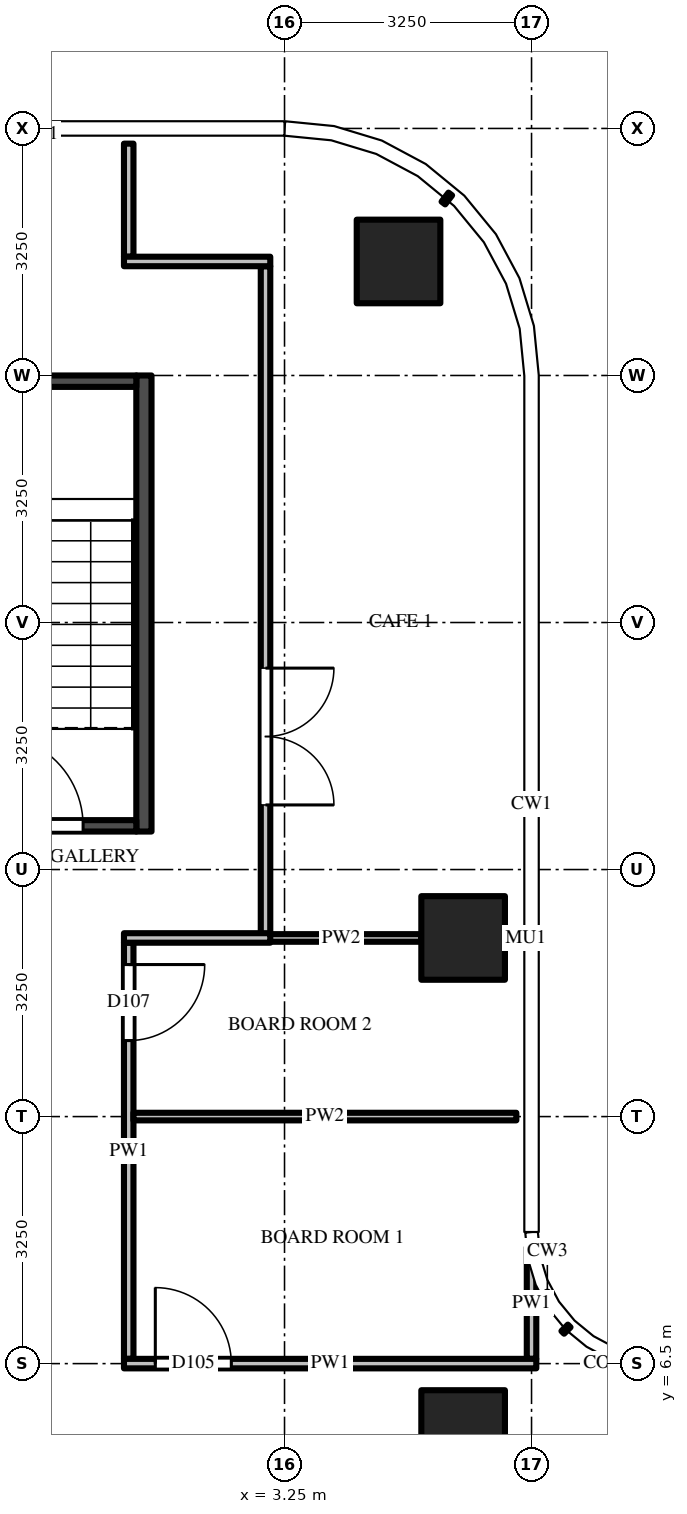
"""IFC4 building model, lengths in metres.
Left out: names, types, materials, properties, quantities, classifications, styles, units other than length and angle.
Written with IfcOpenShell. Run it as: python <this file> out.ifc"""

import sys

from ifc_helpers import new_model, si_unit, direction, frame, frame_2d, origin, origin_2d, place, context, subcontext, project, spatial, rectangle, extrude, source, transform, mapped, element, fill, save


model = new_model("IFC4")
c1 = context("Model", 3, precision=1e-05, world=origin(), true_north=direction((0.0, 1.0)))
c2 = subcontext(c1, "Body", "Model", "MODEL_VIEW")
j1 = project(units=[si_unit("LENGTHUNIT", "METRE"), si_unit("PLANEANGLEUNIT", "RADIAN")], contexts=[c1])
p1 = place(None, origin())
s1 = spatial("IfcSite", under=j1, at=p1, CompositionType="ELEMENT")
p2 = place(p1, origin())
s2 = spatial("IfcBuilding", under=s1, at=p2, CompositionType="ELEMENT")
p3 = place(p2, frame((0.0, 0.0, 251.9)))
s3 = spatial("IfcBuildingStorey", under=s2, at=p3, CompositionType="ELEMENT", Elevation=251.9)
m1 = source(origin(), c2, "Body", "SweptSolid", [
    extrude(rectangle(XDim=1.1, YDim=1.1, at=origin_2d()), origin(), (0.0, 0.0, 1.0), 3.9),
])
for number, where, z_axis, x_axis in (
    (1, (5.6, 12.1, 0.0), (0.0, 0.0, 1.0), (1.0, 0.0, 0.0)),
    (2, (4.75, 21.0, 0.0), (0.0, 0.0, 1.0), (1.0, 0.0, 0.0)),
    (3, (5.6, 5.6, 0.0), (0.0, 0.0, 1.0), (1.0, 0.0, 0.0)),
):
    element("IfcColumn", number, at=place(p3, frame(where, z_axis=z_axis, x_axis=x_axis)), inside=s3, PredefinedType="COLUMN", context=c2, shape_type="MappedRepresentation", body=[
        mapped(m1, transform((0.0, 0.0, 0.0))),
    ])
m2 = source(origin(), c2, "Body", "SweptSolid", [
    extrude(rectangle(XDim=6.0, YDim=0.2, at=frame_2d((3.0, 0.0))), origin(), (0.0, 0.0, 1.0), 3.7),
])
p4 = place(p3, frame((1.4, 13.5, 0.0), z_axis=(0.0, 0.0, 1.0), x_axis=(0.0, 1.0, 0.0)))
e4 = element("IfcWall", 4, at=p4, inside=s3, PredefinedType="SHEAR", context=c2, shape_type="MappedRepresentation", body=[
    mapped(m2, transform((0.0, 0.0, 0.0))),
])
m3 = source(origin(), c2, "Body", "SweptSolid", [
    extrude(rectangle(XDim=2.6, YDim=0.15, at=frame_2d((1.3, 0.0))), origin(), (0.0, 0.0, 1.0), 3.7),
])
p5 = place(p3, frame((-1.3, 13.575, 0.0), z_axis=(0.0, 0.0, 1.0), x_axis=(1.0, 0.0, 0.0)))
e5 = element("IfcWall", 5, at=p5, inside=s3, PredefinedType="SHEAR", context=c2, shape_type="MappedRepresentation", body=[
    mapped(m3, transform((0.0, 0.0, 0.0))),
])
m4 = source(origin(), c2, "Body", "SweptSolid", [
    extrude(rectangle(XDim=1.2, YDim=2.1, at=frame_2d((0.6, 1.05))), frame((0.0, 0.085, 0.0), z_axis=(0.0, -1.0, 0.0), x_axis=(1.0, 0.0, 0.0)), (0.0, 0.0, 1.0), 0.17),
])
p6 = place(p5, frame((0.7, 0.0, 0.0)))
e6 = element("IfcOpeningElement", 6, at=p6, cuts=e5, PredefinedType="OPENING", context=c2, shape_type="MappedRepresentation", body=[
    mapped(m4, transform((0.0, 0.0, 0.0))),
])
p7 = place(p3, frame((-1.3, 19.425, 0.0), z_axis=(0.0, 0.0, 1.0), x_axis=(1.0, 0.0, 0.0)))
e7 = element("IfcWall", 7, at=p7, inside=s3, PredefinedType="SHEAR", context=c2, shape_type="MappedRepresentation", body=[
    mapped(m3, transform((0.0, 0.0, 0.0))),
])
m5 = source(origin(), c2, "Body", "SweptSolid", [
    extrude(rectangle(XDim=5.475, YDim=0.125, at=frame_2d((2.738, 0.0))), origin(), (0.0, 0.0, 1.0), 2.997),
])
p8 = place(p3, frame((1.2, 12.038, 0.0), z_axis=(0.0, 0.0, 1.0), x_axis=(0.0, -1.0, 0.0)))
e8 = element("IfcWall", 8, at=p8, inside=s3, PredefinedType="PARTITIONING", context=c2, shape_type="MappedRepresentation", body=[
    mapped(m5, transform((0.0, 0.0, 0.0))),
])
m6 = source(origin(), c2, "Body", "SweptSolid", [
    extrude(rectangle(XDim=1.0, YDim=2.1, at=frame_2d((0.5, 1.05))), frame((0.0, 0.073, 0.0), z_axis=(0.0, -1.0, 0.0), x_axis=(1.0, 0.0, 0.0)), (0.0, 0.0, 1.0), 0.145),
])
p9 = place(p8, frame((0.288, 0.0, 0.0)))
e9 = element("IfcOpeningElement", 9, at=p9, cuts=e8, PredefinedType="OPENING", context=c2, shape_type="MappedRepresentation", body=[
    mapped(m6, transform((0.0, 0.0, 0.0))),
])
m7 = source(origin(), c2, "Body", "SweptSolid", [
    extrude(rectangle(XDim=1.488, YDim=0.125, at=frame_2d((0.744, 0.0))), origin(), (0.0, 0.0, 1.0), 2.78),
])
p10 = place(p3, frame((1.2, 22.55, 0.0), z_axis=(0.0, 0.0, 1.0), x_axis=(0.0, -1.0, 0.0)))
e10 = element("IfcWall", 10, at=p10, inside=s3, PredefinedType="PARTITIONING", context=c2, shape_type="MappedRepresentation", body=[
    mapped(m7, transform((0.0, 0.0, 0.0))),
])
m8 = source(origin(), c2, "Body", "SweptSolid", [
    extrude(rectangle(XDim=8.788, YDim=0.125, at=frame_2d((4.394, 0.0))), origin(), (0.0, 0.0, 1.0), 2.78),
])
p11 = place(p3, frame((3.0, 20.938, 0.0), z_axis=(0.0, 0.0, 1.0), x_axis=(0.0, -1.0, 0.0)))
e11 = element("IfcWall", 11, at=p11, inside=s3, PredefinedType="PARTITIONING", context=c2, shape_type="MappedRepresentation", body=[
    mapped(m8, transform((0.0, 0.0, 0.0))),
])
m9 = source(origin(), c2, "Body", "SweptSolid", [
    extrude(rectangle(XDim=1.8, YDim=2.1, at=frame_2d((0.9, 1.05))), frame((0.0, 0.073, 0.0), z_axis=(0.0, -1.0, 0.0), x_axis=(1.0, 0.0, 0.0)), (0.0, 0.0, 1.0), 0.145),
])
p12 = place(p11, frame((5.288, 0.0, 0.0)))
e12 = element("IfcOpeningElement", 12, at=p12, cuts=e11, PredefinedType="OPENING", context=c2, shape_type="MappedRepresentation", body=[
    mapped(m9, transform((0.0, 0.0, 0.0))),
])
m10 = source(origin(), c2, "Body", "SweptSolid", [
    extrude(rectangle(XDim=1.469, YDim=0.125, at=frame_2d((0.734, 0.0))), origin(), (0.0, 0.0, 1.0), 3.7),
])
p13 = place(p3, frame((6.5, 6.562, 0.0), z_axis=(0.0, 0.0, 1.0), x_axis=(0.0, 1.0, 0.0)))
e13 = element("IfcWall", 13, at=p13, inside=s3, PredefinedType="PARTITIONING", context=c2, shape_type="MappedRepresentation", body=[
    mapped(m10, transform((0.0, 0.0, 0.0))),
])
m11 = source(origin(), c2, "Body", "SweptSolid", [
    extrude(rectangle(XDim=5.425, YDim=0.125, at=frame_2d((2.712, 0.0))), origin(), (0.0, 0.0, 1.0), 2.78),
])
p14 = place(p3, frame((1.137, 6.5, 0.0), z_axis=(0.0, 0.0, 1.0), x_axis=(1.0, 0.0, 0.0)))
e14 = element("IfcWall", 14, at=p14, inside=s3, PredefinedType="PARTITIONING", context=c2, shape_type="MappedRepresentation", body=[
    mapped(m11, transform((0.0, 0.0, 0.0))),
])
p15 = place(p14, frame((0.413, 0.0, 0.0)))
e15 = element("IfcOpeningElement", 15, at=p15, cuts=e14, PredefinedType="OPENING", context=c2, shape_type="MappedRepresentation", body=[
    mapped(m6, transform((0.0, 0.0, 0.0))),
])
m12 = source(origin(), c2, "Body", "SweptSolid", [
    extrude(rectangle(XDim=5.038, YDim=0.1, at=frame_2d((2.519, 0.0))), origin(), (0.0, 0.0, 1.0), 2.78),
])
p16 = place(p3, frame((1.262, 9.75, 0.0), z_axis=(0.0, 0.0, 1.0), x_axis=(1.0, 0.0, 0.0)))
e16 = element("IfcWall", 16, at=p16, inside=s3, PredefinedType="PARTITIONING", context=c2, shape_type="MappedRepresentation", body=[
    mapped(m12, transform((0.0, 0.0, 0.0))),
])
m13 = source(origin(), c2, "Body", "SweptSolid", [
    extrude(rectangle(XDim=2.113, YDim=0.1, at=frame_2d((1.056, 0.0))), origin(), (0.0, 0.0, 1.0), 2.997),
])
p17 = place(p3, frame((2.938, 12.1, 0.0), z_axis=(0.0, 0.0, 1.0), x_axis=(1.0, 0.0, 0.0)))
e17 = element("IfcWall", 17, at=p17, inside=s3, PredefinedType="PARTITIONING", context=c2, shape_type="MappedRepresentation", body=[
    mapped(m13, transform((0.0, 0.0, 0.0))),
])
m14 = source(origin(), c2, "Body", "SweptSolid", [
    extrude(rectangle(XDim=1.925, YDim=0.125, at=frame_2d((0.962, 0.0))), origin(), (0.0, 0.0, 1.0), 2.997),
])
p18 = place(p3, frame((3.062, 12.1, 0.0), z_axis=(0.0, 0.0, 1.0), x_axis=(-1.0, 0.0, 0.0)))
e18 = element("IfcWall", 18, at=p18, inside=s3, PredefinedType="PARTITIONING", context=c2, shape_type="MappedRepresentation", body=[
    mapped(m14, transform((0.0, 0.0, 0.0))),
])
m15 = source(origin(), c2, "Body", "SweptSolid", [
    extrude(rectangle(XDim=1.925, YDim=0.125, at=frame_2d((0.962, 0.0))), origin(), (0.0, 0.0, 1.0), 2.78),
])
p19 = place(p3, frame((1.137, 21.0, 0.0), z_axis=(0.0, 0.0, 1.0), x_axis=(1.0, 0.0, 0.0)))
e19 = element("IfcWall", 19, at=p19, inside=s3, PredefinedType="PARTITIONING", context=c2, shape_type="MappedRepresentation", body=[
    mapped(m15, transform((0.0, 0.0, 0.0))),
])
m16 = source(origin(), c2, "Body", "SweptSolid", [
    extrude(rectangle(XDim=1.2, YDim=2.1, at=frame_2d((0.6, 1.05))), frame((0.0, 0.025, 0.0), z_axis=(0.0, -1.0, 0.0), x_axis=(1.0, 0.0, 0.0)), (0.0, 0.0, 1.0), 0.05),
])
p20 = place(p6, origin())
e20 = element("IfcDoor", 20, at=p20, inside=s3, OperationType="SINGLE_SWING_LEFT", PredefinedType="DOOR", context=c2, shape_type="MappedRepresentation", body=[
    mapped(m16, transform((0.0, 0.0, 0.0))),
])
fill(e6, e20)
m17 = source(origin(), c2, "Body", "SweptSolid", [
    extrude(rectangle(XDim=1.0, YDim=2.1, at=frame_2d((0.5, 1.05))), frame((0.0, 0.025, 0.0), z_axis=(0.0, -1.0, 0.0), x_axis=(1.0, 0.0, 0.0)), (0.0, 0.0, 1.0), 0.05),
])
p21 = place(p15, origin())
e21 = element("IfcDoor", 21, at=p21, inside=s3, OperationType="SINGLE_SWING_LEFT", PredefinedType="DOOR", context=c2, shape_type="MappedRepresentation", body=[
    mapped(m17, transform((0.0, 0.0, 0.0))),
])
fill(e15, e21)
p22 = place(p9, origin())
e22 = element("IfcDoor", 22, at=p22, inside=s3, OperationType="SINGLE_SWING_LEFT", PredefinedType="DOOR", context=c2, shape_type="MappedRepresentation", body=[
    mapped(m17, transform((0.0, 0.0, 0.0))),
])
fill(e9, e22)
m18 = source(origin(), c2, "Body", "SweptSolid", [
    extrude(rectangle(XDim=1.8, YDim=2.1, at=frame_2d((0.9, 1.05))), frame((0.0, 0.025, 0.0), z_axis=(0.0, -1.0, 0.0), x_axis=(1.0, 0.0, 0.0)), (0.0, 0.0, 1.0), 0.05),
])
p23 = place(p12, origin())
e23 = element("IfcDoor", 23, at=p23, inside=s3, OperationType="DOUBLE_DOOR_SINGLE_SWING", PredefinedType="DOOR", context=c2, shape_type="MappedRepresentation", body=[
    mapped(m18, transform((0.0, 0.0, 0.0))),
])
fill(e12, e23)
save(model, sys.argv[1])
